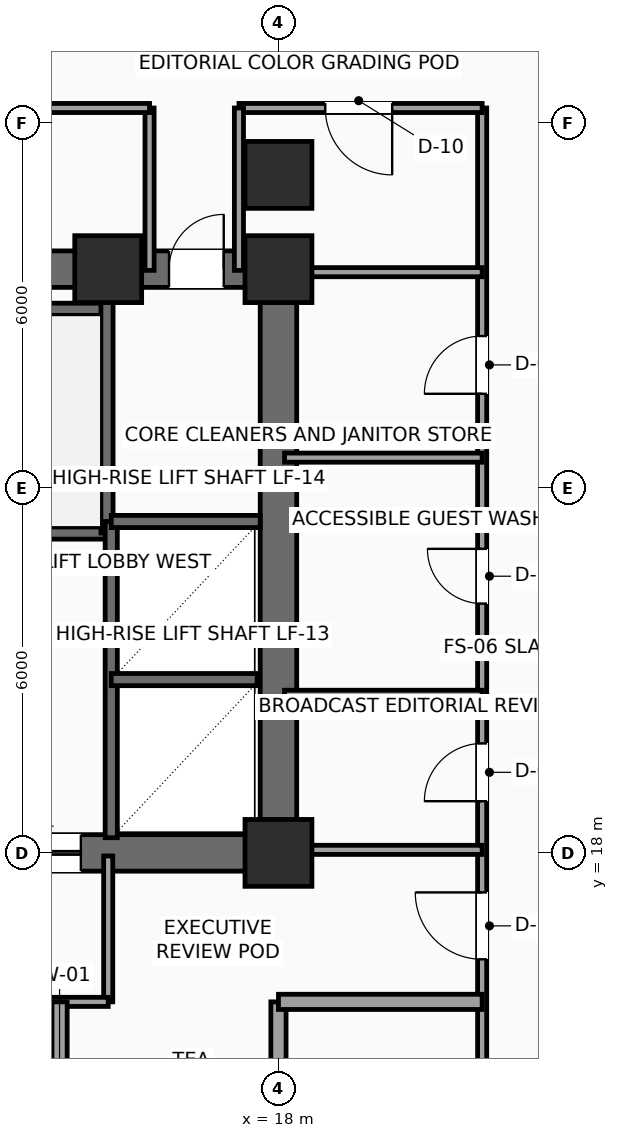
"""IFC4 building model, lengths in metres.
Left out: names, types, materials, properties, quantities, classifications, styles, units other than length and angle.
Written with IfcOpenShell. Run it as: python <this file> out.ifc"""

import sys

from ifc_helpers import new_model, si_unit, direction, frame, frame_2d, origin, origin_2d, place, context, subcontext, project, spatial, rectangle, extrude, element, fill, save


model = new_model("IFC4")
c1 = context("Model", 3, precision=1e-05, world=origin(), true_north=direction((0.0, 1.0)))
c2 = subcontext(c1, "Body", "Model", "MODEL_VIEW")
j1 = project(units=[si_unit("LENGTHUNIT", "METRE"), si_unit("PLANEANGLEUNIT", "RADIAN")], contexts=[c1])
p1 = place(None, origin())
s1 = spatial("IfcSite", under=j1, at=p1, CompositionType="ELEMENT")
p2 = place(p1, origin())
s2 = spatial("IfcBuilding", under=s1, at=p2, CompositionType="ELEMENT")
p3 = place(p2, frame((0.0, 0.0, 134.4)))
s3 = spatial("IfcBuildingStorey", under=s2, at=p3, CompositionType="ELEMENT", Elevation=134.4)
for number, where, z_axis, x_axis in (
    (1, (18.0, 18.0, 0.0), (0.0, 0.0, 1.0), (1.0, 0.0, 0.0)),
    (2, (15.2, 27.6, 0.0), (0.0, 0.0, 1.0), (1.0, 0.0, 0.0)),
    (3, (18.0, 27.6, 0.0), (0.0, 0.0, 1.0), (1.0, 0.0, 0.0)),
    (4, (18.0, 29.15, 0.0), (0.0, 0.0, 1.0), (1.0, 0.0, 0.0)),
):
    element("IfcColumn", number, at=place(p3, frame(where, z_axis=z_axis, x_axis=x_axis)), inside=s3, PredefinedType="COLUMN", context=c2, shape_type="SweptSolid", body=[
        extrude(rectangle(XDim=1.1, YDim=1.1, at=origin_2d()), origin(), (0.0, 0.0, 1.0), 3.75),
    ])
p4 = place(p3, frame((6.0, 18.0, 0.0), z_axis=(0.0, 0.0, 1.0), x_axis=(1.0, 0.0, 0.0)))
e5 = element("IfcWall", 5, at=p4, inside=s3, PredefinedType="SHEAR", context=c2, shape_type="SweptSolid", body=[
    extrude(rectangle(XDim=12.0, YDim=0.6, at=frame_2d((6.0, 0.0))), origin(), (0.0, 0.0, 1.0), 3.525),
])
p5 = place(p4, frame((7.15, 0.0, 0.0)))
e6 = element("IfcOpeningElement", 6, at=p5, cuts=e5, PredefinedType="OPENING", context=c2, shape_type="SweptSolid", body=[
    extrude(rectangle(XDim=1.6, YDim=2.3, at=frame_2d((0.8, 1.15))), frame((0.0, 0.31, 0.0), z_axis=(0.0, -1.0, 0.0), x_axis=(1.0, 0.0, 0.0)), (0.0, 0.0, 1.0), 0.62),
])
p6 = place(p3, frame((6.0, 27.6, 0.0), z_axis=(0.0, 0.0, 1.0), x_axis=(1.0, 0.0, 0.0)))
e7 = element("IfcWall", 7, at=p6, inside=s3, PredefinedType="SHEAR", context=c2, shape_type="SweptSolid", body=[
    extrude(rectangle(XDim=12.0, YDim=0.6, at=frame_2d((6.0, 0.0))), origin(), (0.0, 0.0, 1.0), 3.525),
])
p7 = place(p6, frame((10.2, 0.0, 0.0)))
e8 = element("IfcOpeningElement", 8, at=p7, cuts=e7, PredefinedType="OPENING", context=c2, shape_type="SweptSolid", body=[
    extrude(rectangle(XDim=0.9, YDim=2.15, at=frame_2d((0.45, 1.075))), frame((0.0, 0.31, 0.0), z_axis=(0.0, -1.0, 0.0), x_axis=(1.0, 0.0, 0.0)), (0.0, 0.0, 1.0), 0.62),
])
p8 = place(p3, frame((18.0, 18.0, 0.0), z_axis=(0.0, 0.0, 1.0), x_axis=(0.0, 1.0, 0.0)))
e9 = element("IfcWall", 9, at=p8, inside=s3, PredefinedType="SHEAR", context=c2, shape_type="SweptSolid", body=[
    extrude(rectangle(XDim=9.6, YDim=0.6, at=frame_2d((4.8, 0.0))), origin(), (0.0, 0.0, 1.0), 3.525),
])
p9 = place(p3, frame((6.3, 23.26, 0.0), z_axis=(0.0, 0.0, 1.0), x_axis=(1.0, 0.0, 0.0)))
e10 = element("IfcWall", 10, at=p9, inside=s3, PredefinedType="SHEAR", context=c2, shape_type="SweptSolid", body=[
    extrude(rectangle(XDim=8.88, YDim=0.2, at=frame_2d((4.44, 0.0))), origin(), (0.0, 0.0, 1.0), 3.525),
])
p10 = place(p9, frame((0.35, 0.0, 0.0)))
e11 = element("IfcOpeningElement", 11, at=p10, cuts=e10, PredefinedType="OPENING", context=c2, shape_type="SweptSolid", body=[
    extrude(rectangle(XDim=1.1, YDim=2.2, at=frame_2d((0.55, 1.1))), frame((0.0, 0.11, 0.0), z_axis=(0.0, -1.0, 0.0), x_axis=(1.0, 0.0, 0.0)), (0.0, 0.0, 1.0), 0.22),
])
p11 = place(p3, frame((6.3, 26.94, 0.0), z_axis=(0.0, 0.0, 1.0), x_axis=(1.0, 0.0, 0.0)))
e12 = element("IfcWall", 12, at=p11, inside=s3, PredefinedType="SHEAR", context=c2, shape_type="SweptSolid", body=[
    extrude(rectangle(XDim=8.88, YDim=0.2, at=frame_2d((4.44, 0.0))), origin(), (0.0, 0.0, 1.0), 3.525),
])
p12 = place(p3, frame((15.18, 23.26, 0.0), z_axis=(0.0, 0.0, 1.0), x_axis=(0.0, 1.0, 0.0)))
e13 = element("IfcWall", 13, at=p12, inside=s3, PredefinedType="SHEAR", context=c2, shape_type="SweptSolid", body=[
    extrude(rectangle(XDim=4.04, YDim=0.2, at=frame_2d((2.02, 0.0))), origin(), (0.0, 0.0, 1.0), 3.525),
])
p13 = place(p3, frame((15.25, 18.25, 0.0), z_axis=(0.0, 0.0, 1.0), x_axis=(0.0, 1.0, 0.0)))
e14 = element("IfcWall", 14, at=p13, inside=s3, PredefinedType="SHEAR", context=c2, shape_type="SweptSolid", body=[
    extrude(rectangle(XDim=5.2, YDim=0.2, at=frame_2d((2.6, 0.0))), origin(), (0.0, 0.0, 1.0), 3.525),
])
p14 = place(p3, frame((15.25, 20.85, 0.0), z_axis=(0.0, 0.0, 1.0), x_axis=(1.0, 0.0, 0.0)))
e15 = element("IfcWall", 15, at=p14, inside=s3, PredefinedType="SHEAR", context=c2, shape_type="SweptSolid", body=[
    extrude(rectangle(XDim=2.4, YDim=0.2, at=frame_2d((1.2, 0.0))), origin(), (0.0, 0.0, 1.0), 3.525),
])
p15 = place(p3, frame((15.25, 23.45, 0.0), z_axis=(0.0, 0.0, 1.0), x_axis=(1.0, 0.0, 0.0)))
e16 = element("IfcWall", 16, at=p15, inside=s3, PredefinedType="SHEAR", context=c2, shape_type="SweptSolid", body=[
    extrude(rectangle(XDim=2.45, YDim=0.2, at=frame_2d((1.225, 0.0))), origin(), (0.0, 0.0, 1.0), 3.525),
])
p16 = place(p3, frame((15.2, 17.95, 0.0), z_axis=(0.0, 0.0, 1.0), x_axis=(0.0, -1.0, 0.0)))
e17 = element("IfcWall", 17, at=p16, inside=s3, PredefinedType="PARTITIONING", context=c2, shape_type="SweptSolid", body=[
    extrude(rectangle(XDim=2.4, YDim=0.15, at=frame_2d((1.2, 0.0))), origin(), (0.0, 0.0, 1.0), 3.525),
])
p17 = place(p3, frame((15.2, 15.55, 0.0), z_axis=(0.0, 0.0, 1.0), x_axis=(-1.0, 0.0, 0.0)))
e18 = element("IfcWall", 18, at=p17, inside=s3, PredefinedType="PARTITIONING", context=c2, shape_type="SweptSolid", body=[
    extrude(rectangle(XDim=4.4, YDim=0.15, at=frame_2d((2.2, 0.0))), origin(), (0.0, 0.0, 1.0), 3.525),
])
p18 = place(p3, frame((21.35, 11.65, 0.0), z_axis=(0.0, 0.0, 1.0), x_axis=(0.0, 1.0, 0.0)))
e19 = element("IfcWall", 19, at=p18, inside=s3, PredefinedType="PARTITIONING", context=c2, shape_type="SweptSolid", body=[
    extrude(rectangle(XDim=18.6, YDim=0.15, at=frame_2d((9.3, 0.0))), origin(), (0.0, 0.0, 1.0), 3.525),
])
p19 = place(p18, frame((7.2, 0.0, 0.0)))
e20 = element("IfcOpeningElement", 20, at=p19, cuts=e19, PredefinedType="OPENING", context=c2, shape_type="SweptSolid", body=[
    extrude(rectangle(XDim=0.95, YDim=2.15, at=frame_2d((0.475, 1.075))), frame((0.0, 0.085, 0.0), z_axis=(0.0, -1.0, 0.0), x_axis=(1.0, 0.0, 0.0)), (0.0, 0.0, 1.0), 0.17),
])
p20 = place(p18, frame((10.45, 0.0, 0.0)))
e21 = element("IfcOpeningElement", 21, at=p20, cuts=e19, PredefinedType="OPENING", context=c2, shape_type="SweptSolid", body=[
    extrude(rectangle(XDim=0.9, YDim=2.1, at=frame_2d((0.45, 1.05))), frame((0.0, 0.085, 0.0), z_axis=(0.0, -1.0, 0.0), x_axis=(1.0, 0.0, 0.0)), (0.0, 0.0, 1.0), 0.17),
])
p21 = place(p18, frame((13.9, 0.0, 0.0)))
e22 = element("IfcOpeningElement", 22, at=p21, cuts=e19, PredefinedType="OPENING", context=c2, shape_type="SweptSolid", body=[
    extrude(rectangle(XDim=0.95, YDim=2.15, at=frame_2d((0.475, 1.075))), frame((0.0, 0.085, 0.0), z_axis=(0.0, -1.0, 0.0), x_axis=(1.0, 0.0, 0.0)), (0.0, 0.0, 1.0), 0.17),
])
p22 = place(p18, frame((4.6, 0.0, 0.0)))
e23 = element("IfcOpeningElement", 23, at=p22, cuts=e19, PredefinedType="OPENING", context=c2, shape_type="SweptSolid", body=[
    extrude(rectangle(XDim=1.1, YDim=2.25, at=frame_2d((0.55, 1.125))), frame((0.0, 0.085, 0.0), z_axis=(0.0, -1.0, 0.0), x_axis=(1.0, 0.0, 0.0)), (0.0, 0.0, 1.0), 0.17),
])
p23 = place(p3, frame((21.35, 30.25, 0.0), z_axis=(0.0, 0.0, 1.0), x_axis=(-1.0, 0.0, 0.0)))
e24 = element("IfcWall", 24, at=p23, inside=s3, PredefinedType="PARTITIONING", context=c2, shape_type="SweptSolid", body=[
    extrude(rectangle(XDim=4.0, YDim=0.15, at=frame_2d((2.0, 0.0))), origin(), (0.0, 0.0, 1.0), 3.525),
])
p24 = place(p23, frame((1.48, 0.0, 0.0)))
e25 = element("IfcOpeningElement", 25, at=p24, cuts=e24, PredefinedType="OPENING", context=c2, shape_type="SweptSolid", body=[
    extrude(rectangle(XDim=1.1, YDim=2.25, at=frame_2d((0.55, 1.125))), frame((0.0, 0.085, 0.0), z_axis=(0.0, -1.0, 0.0), x_axis=(1.0, 0.0, 0.0)), (0.0, 0.0, 1.0), 0.17),
])
for number, where, z_axis, x_axis in (
    (26, (17.35, 30.25, 0.0), (0.0, 0.0, 1.0), (0.0, -1.0, 0.0)),
    (27, (15.88, 27.58, 0.0), (0.0, 0.0, 1.0), (0.0, 1.0, 0.0)),
):
    element("IfcWall", number, at=place(p3, frame(where, z_axis=z_axis, x_axis=x_axis)), inside=s3, PredefinedType="PARTITIONING", context=c2, shape_type="SweptSolid", body=[
        extrude(rectangle(XDim=2.67, YDim=0.15, at=frame_2d((1.335, 0.0))), origin(), (0.0, 0.0, 1.0), 3.525),
    ])
p25 = place(p3, frame((15.88, 30.25, 0.0), z_axis=(0.0, 0.0, 1.0), x_axis=(-1.0, 0.0, 0.0)))
e28 = element("IfcWall", 28, at=p25, inside=s3, PredefinedType="PARTITIONING", context=c2, shape_type="SweptSolid", body=[
    extrude(rectangle(XDim=15.58, YDim=0.15, at=frame_2d((7.79, 0.0))), origin(), (0.0, 0.0, 1.0), 3.525),
])
p26 = place(p25, frame((12.23, 0.0, 0.0)))
e29 = element("IfcOpeningElement", 29, at=p26, cuts=e28, PredefinedType="OPENING", context=c2, shape_type="SweptSolid", body=[
    extrude(rectangle(XDim=1.1, YDim=2.25, at=frame_2d((0.55, 1.125))), frame((0.0, 0.085, 0.0), z_axis=(0.0, -1.0, 0.0), x_axis=(1.0, 0.0, 0.0)), (0.0, 0.0, 1.0), 0.17),
])
p27 = place(p25, frame((6.68, 0.0, 0.0)))
e30 = element("IfcOpeningElement", 30, at=p27, cuts=e28, PredefinedType="OPENING", context=c2, shape_type="SweptSolid", body=[
    extrude(rectangle(XDim=1.1, YDim=2.25, at=frame_2d((0.55, 1.125))), frame((0.0, 0.085, 0.0), z_axis=(0.0, -1.0, 0.0), x_axis=(1.0, 0.0, 0.0)), (0.0, 0.0, 1.0), 0.17),
])
p28 = place(p25, frame((1.93, 0.0, 0.0)))
e31 = element("IfcOpeningElement", 31, at=p28, cuts=e28, PredefinedType="OPENING", context=c2, shape_type="SweptSolid", body=[
    extrude(rectangle(XDim=1.1, YDim=2.25, at=frame_2d((0.55, 1.125))), frame((0.0, 0.085, 0.0), z_axis=(0.0, -1.0, 0.0), x_axis=(1.0, 0.0, 0.0)), (0.0, 0.0, 1.0), 0.17),
])
p29 = place(p3, frame((14.4, 11.65, 0.0), z_axis=(0.0, 0.0, 1.0), x_axis=(0.0, 1.0, 0.0)))
e32 = element("IfcWall", 32, at=p29, inside=s3, PredefinedType="PARTITIONING", context=c2, shape_type="SweptSolid", body=[
    extrude(rectangle(XDim=3.9, YDim=0.25, at=frame_2d((1.95, 0.0))), origin(), (0.0, 0.0, 1.0), 3.525),
])
p30 = place(p3, frame((18.0, 11.65, 0.0), z_axis=(0.0, 0.0, 1.0), x_axis=(0.0, 1.0, 0.0)))
e33 = element("IfcWall", 33, at=p30, inside=s3, PredefinedType="PARTITIONING", context=c2, shape_type="SweptSolid", body=[
    extrude(rectangle(XDim=3.9, YDim=0.25, at=frame_2d((1.95, 0.0))), origin(), (0.0, 0.0, 1.0), 3.017),
])
p31 = place(p3, frame((18.0, 15.55, 0.0), z_axis=(0.0, 0.0, 1.0), x_axis=(1.0, 0.0, 0.0)))
e34 = element("IfcWall", 34, at=p31, inside=s3, PredefinedType="PARTITIONING", context=c2, shape_type="SweptSolid", body=[
    extrude(rectangle(XDim=3.35, YDim=0.25, at=frame_2d((1.675, 0.0))), origin(), (0.0, 0.0, 1.0), 3.525),
])
p32 = place(p3, frame((18.1, 18.05, 0.0), z_axis=(0.0, 0.0, 1.0), x_axis=(1.0, 0.0, 0.0)))
e35 = element("IfcWall", 35, at=p32, inside=s3, PredefinedType="PARTITIONING", context=c2, shape_type="SweptSolid", body=[
    extrude(rectangle(XDim=3.25, YDim=0.15, at=frame_2d((1.625, 0.0))), origin(), (0.0, 0.0, 1.0), 3.017),
])
for number, where, z_axis, x_axis in (
    (36, (18.1, 20.6, 0.0), (0.0, 0.0, 1.0), (1.0, 0.0, 0.0)),
    (37, (18.1, 24.5, 0.0), (0.0, 0.0, 1.0), (1.0, 0.0, 0.0)),
    (38, (18.1, 27.55, 0.0), (0.0, 0.0, 1.0), (1.0, 0.0, 0.0)),
):
    element("IfcWall", number, at=place(p3, frame(where, z_axis=z_axis, x_axis=x_axis)), inside=s3, PredefinedType="PARTITIONING", context=c2, shape_type="SweptSolid", body=[
        extrude(rectangle(XDim=3.25, YDim=0.15, at=frame_2d((1.625, 0.0))), origin(), (0.0, 0.0, 1.0), 3.525),
    ])
p33 = place(p5, origin())
e39 = element("IfcDoor", 39, at=p33, inside=s3, OperationType="DOUBLE_DOOR_SLIDING", PredefinedType="DOOR", context=c2, shape_type="SweptSolid", body=[
    extrude(rectangle(XDim=1.6, YDim=2.3, at=frame_2d((0.8, 1.15))), frame((0.0, 0.025, 0.0), z_axis=(0.0, -1.0, 0.0), x_axis=(1.0, 0.0, 0.0)), (0.0, 0.0, 1.0), 0.05),
])
fill(e6, e39)
p34 = place(p7, origin())
e40 = element("IfcDoor", 40, at=p34, inside=s3, OperationType="SINGLE_SWING_RIGHT", PredefinedType="DOOR", context=c2, shape_type="SweptSolid", body=[
    extrude(rectangle(XDim=0.9, YDim=2.15, at=frame_2d((0.45, 1.075))), frame((0.0, 0.025, 0.0), z_axis=(0.0, -1.0, 0.0), x_axis=(1.0, 0.0, 0.0)), (0.0, 0.0, 1.0), 0.05),
])
fill(e8, e40)
p35 = place(p19, origin())
e41 = element("IfcDoor", 41, at=p35, inside=s3, OperationType="SINGLE_SWING_LEFT", PredefinedType="DOOR", context=c2, shape_type="SweptSolid", body=[
    extrude(rectangle(XDim=0.95, YDim=2.15, at=frame_2d((0.475, 1.075))), frame((0.0, 0.025, 0.0), z_axis=(0.0, -1.0, 0.0), x_axis=(1.0, 0.0, 0.0)), (0.0, 0.0, 1.0), 0.05),
])
fill(e20, e41)
p36 = place(p20, origin())
e42 = element("IfcDoor", 42, at=p36, inside=s3, OperationType="SINGLE_SWING_RIGHT", PredefinedType="DOOR", context=c2, shape_type="SweptSolid", body=[
    extrude(rectangle(XDim=0.9, YDim=2.1, at=frame_2d((0.45, 1.05))), frame((0.0, 0.025, 0.0), z_axis=(0.0, -1.0, 0.0), x_axis=(1.0, 0.0, 0.0)), (0.0, 0.0, 1.0), 0.05),
])
fill(e21, e42)
p37 = place(p21, origin())
e43 = element("IfcDoor", 43, at=p37, inside=s3, OperationType="SINGLE_SWING_LEFT", PredefinedType="DOOR", context=c2, shape_type="SweptSolid", body=[
    extrude(rectangle(XDim=0.95, YDim=2.15, at=frame_2d((0.475, 1.075))), frame((0.0, 0.025, 0.0), z_axis=(0.0, -1.0, 0.0), x_axis=(1.0, 0.0, 0.0)), (0.0, 0.0, 1.0), 0.05),
])
fill(e22, e43)
p38 = place(p22, origin())
e44 = element("IfcDoor", 44, at=p38, inside=s3, OperationType="SINGLE_SWING_RIGHT", PredefinedType="DOOR", context=c2, shape_type="SweptSolid", body=[
    extrude(rectangle(XDim=1.1, YDim=2.25, at=frame_2d((0.55, 1.125))), frame((0.0, 0.025, 0.0), z_axis=(0.0, -1.0, 0.0), x_axis=(1.0, 0.0, 0.0)), (0.0, 0.0, 1.0), 0.05),
])
fill(e23, e44)
p39 = place(p24, origin())
e45 = element("IfcDoor", 45, at=p39, inside=s3, OperationType="SINGLE_SWING_LEFT", PredefinedType="DOOR", context=c2, shape_type="SweptSolid", body=[
    extrude(rectangle(XDim=1.1, YDim=2.25, at=frame_2d((0.55, 1.125))), frame((0.0, 0.025, 0.0), z_axis=(0.0, -1.0, 0.0), x_axis=(1.0, 0.0, 0.0)), (0.0, 0.0, 1.0), 0.05),
])
fill(e25, e45)
save(model, sys.argv[1])
